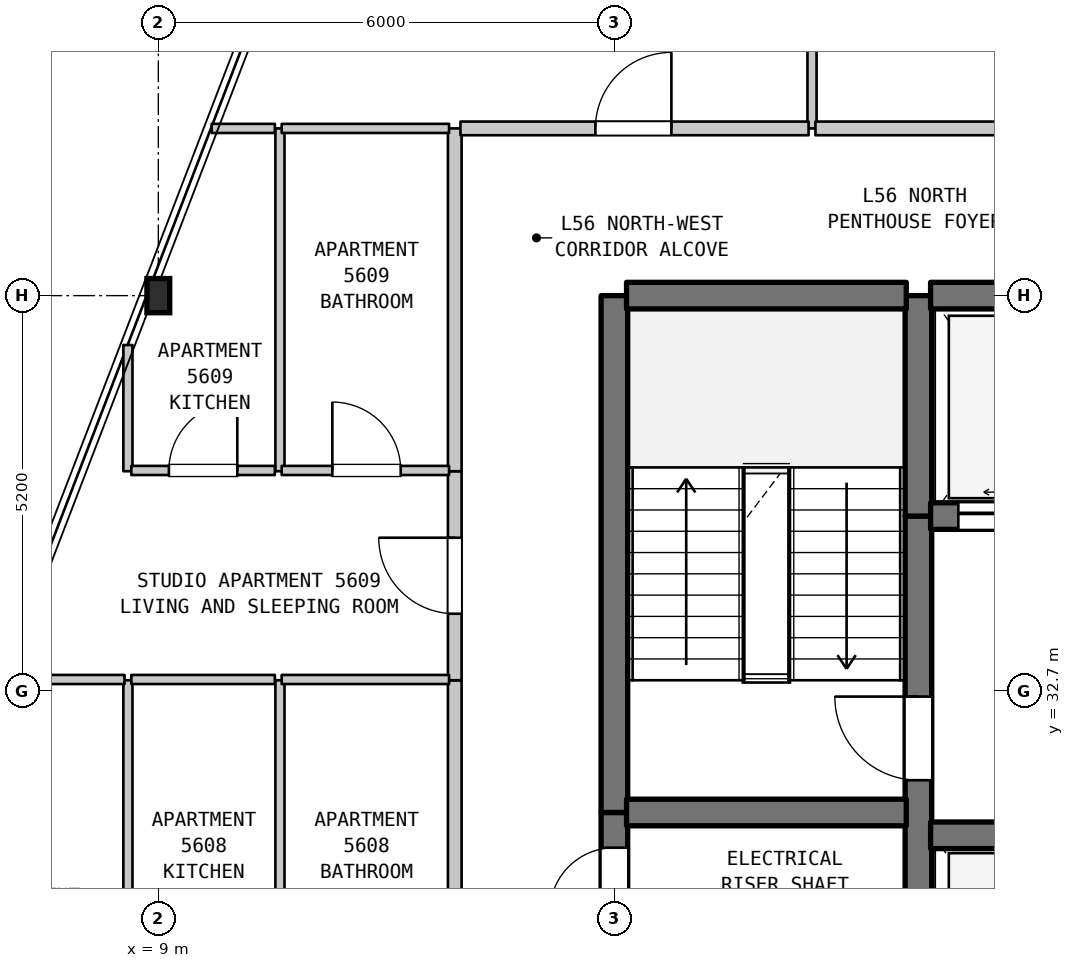
"""IFC4 building model, lengths in metres.
Left out: names, types, materials, properties, quantities, classifications, styles, units other than length and angle.
Written with IfcOpenShell. Run it as: python <this file> out.ifc"""

import sys

from ifc_helpers import new_model, si_unit, direction, frame, frame_2d, origin, origin_2d, place, context, subcontext, project, spatial, rectangle, i_section, extrude, element, fill, save


model = new_model("IFC4")
c1 = context("Model", 3, precision=1e-05, world=origin(), true_north=direction((0.0, 1.0)))
c2 = subcontext(c1, "Body", "Model", "MODEL_VIEW")
j1 = project(units=[si_unit("LENGTHUNIT", "METRE"), si_unit("PLANEANGLEUNIT", "RADIAN")], contexts=[c1])
p1 = place(None, origin())
s1 = spatial("IfcSite", under=j1, at=p1, CompositionType="ELEMENT")
p2 = place(p1, origin())
s2 = spatial("IfcBuilding", under=s1, at=p2, CompositionType="ELEMENT")
p3 = place(p2, frame((0.0, 0.0, 226.5)))
s3 = spatial("IfcBuildingStorey", under=s2, at=p3, CompositionType="ELEMENT", Elevation=226.5)
p4 = place(p3, frame((9.0, 37.9, 0.0), z_axis=(0.0, 0.0, 1.0), x_axis=(1.0, 0.0, 0.0)))
e1 = element("IfcColumn", 1, at=p4, inside=s3, PredefinedType="COLUMN", context=c2, shape_type="SweptSolid", body=[
    extrude(i_section(OverallWidth=0.3, OverallDepth=0.45, WebThickness=0.014, FlangeThickness=0.026, FilletRadius=0.027, at=origin_2d()), origin(), (0.0, 0.0, 1.0), 3.7),
])
p5 = place(p3, frame((8.6, 27.87, 0.0), z_axis=(0.0, 0.0, 1.0), x_axis=(0.0, 1.0, 0.0)))
e2 = element("IfcWall", 2, at=p5, inside=s3, PredefinedType="PARTITIONING", context=c2, shape_type="SweptSolid", body=[
    extrude(rectangle(XDim=4.97, YDim=0.12, at=frame_2d((2.485, 0.0))), origin(), (0.0, 0.0, 1.0), 3.39),
])
p6 = place(p3, frame((8.6, 35.59, 0.0), z_axis=(0.0, 0.0, 1.0), x_axis=(0.0, 1.0, 0.0)))
e3 = element("IfcWall", 3, at=p6, inside=s3, PredefinedType="PARTITIONING", context=c2, shape_type="SweptSolid", body=[
    extrude(rectangle(XDim=1.66, YDim=0.12, at=frame_2d((0.83, 0.0))), origin(), (0.0, 0.0, 1.0), 3.39),
])
p7 = place(p3, frame((10.6, 27.87, 0.0), z_axis=(0.0, 0.0, 1.0), x_axis=(0.0, 1.0, 0.0)))
e4 = element("IfcWall", 4, at=p7, inside=s3, PredefinedType="PARTITIONING", context=c2, shape_type="SweptSolid", body=[
    extrude(rectangle(XDim=4.97, YDim=0.12, at=frame_2d((2.485, 0.0))), origin(), (0.0, 0.0, 1.0), 3.39),
])
p8 = place(p3, frame((10.6, 35.59, 0.0), z_axis=(0.0, 0.0, 1.0), x_axis=(0.0, 1.0, 0.0)))
e5 = element("IfcWall", 5, at=p8, inside=s3, PredefinedType="PARTITIONING", context=c2, shape_type="SweptSolid", body=[
    extrude(rectangle(XDim=4.51, YDim=0.12, at=frame_2d((2.255, 0.0))), origin(), (0.0, 0.0, 1.0), 3.39),
])
p9 = place(p3, frame((12.9, 27.87, 0.0), z_axis=(0.0, 0.0, 1.0), x_axis=(0.0, 1.0, 0.0)))
e6 = element("IfcWall", 6, at=p9, inside=s3, PredefinedType="STANDARD", context=c2, shape_type="SweptSolid", body=[
    extrude(rectangle(XDim=4.97, YDim=0.18, at=frame_2d((2.485, 0.0))), origin(), (0.0, 0.0, 1.0), 3.39),
])
p10 = place(p3, frame((12.9, 32.84, 0.0), z_axis=(0.0, 0.0, 1.0), x_axis=(0.0, 1.0, 0.0)))
e7 = element("IfcWall", 7, at=p10, inside=s3, PredefinedType="STANDARD", context=c2, shape_type="SweptSolid", body=[
    extrude(rectangle(XDim=2.75, YDim=0.18, at=frame_2d((1.375, 0.0))), origin(), (0.0, 0.0, 1.0), 3.39),
])
p11 = place(p10, frame((0.875, 0.0, 0.0)))
e8 = element("IfcOpeningElement", 8, at=p11, cuts=e7, PredefinedType="OPENING", context=c2, shape_type="SweptSolid", body=[
    extrude(rectangle(XDim=1.0, YDim=2.15, at=frame_2d((0.5, 1.075))), frame((0.0, 0.1, 0.0), z_axis=(0.0, -1.0, 0.0), x_axis=(1.0, 0.0, 0.0)), (0.0, 0.0, 1.0), 0.2),
])
p12 = place(p3, frame((12.9, 35.59, 0.0), z_axis=(0.0, 0.0, 1.0), x_axis=(0.0, 1.0, 0.0)))
e9 = element("IfcWall", 9, at=p12, inside=s3, PredefinedType="STANDARD", context=c2, shape_type="SweptSolid", body=[
    extrude(rectangle(XDim=4.51, YDim=0.18, at=frame_2d((2.255, 0.0))), origin(), (0.0, 0.0, 1.0), 3.39),
])
p13 = place(p3, frame((15.0, 29.5, 0.0), z_axis=(0.0, 0.0, 1.0), x_axis=(0.0, 1.0, 0.0)))
e10 = element("IfcWall", 10, at=p13, inside=s3, PredefinedType="SHEAR", context=c2, shape_type="SweptSolid", body=[
    extrude(rectangle(XDim=1.6, YDim=0.35, at=frame_2d((0.8, 0.0))), origin(), (0.0, 0.0, 1.0), 3.39),
])
p14 = place(p13, frame((0.287, 0.0, 0.0)))
e11 = element("IfcOpeningElement", 11, at=p14, cuts=e10, PredefinedType="OPENING", context=c2, shape_type="SweptSolid", body=[
    extrude(rectangle(XDim=0.85, YDim=2.1, at=frame_2d((0.425, 1.05))), frame((0.0, 0.185, 0.0), z_axis=(0.0, -1.0, 0.0), x_axis=(1.0, 0.0, 0.0)), (0.0, 0.0, 1.0), 0.37),
])
p15 = place(p3, frame((15.0, 31.1, 0.0), z_axis=(0.0, 0.0, 1.0), x_axis=(0.0, 1.0, 0.0)))
e12 = element("IfcWall", 12, at=p15, inside=s3, PredefinedType="SHEAR", context=c2, shape_type="SweptSolid", body=[
    extrude(rectangle(XDim=6.8, YDim=0.35, at=frame_2d((3.4, 0.0))), origin(), (0.0, 0.0, 1.0), 3.39),
])
p16 = place(p3, frame((17.6, 40.1, 0.0), z_axis=(0.0, 0.0, 1.0), x_axis=(0.0, 1.0, 0.0)))
e13 = element("IfcWall", 13, at=p16, inside=s3, PredefinedType="PARTITIONING", context=c2, shape_type="SweptSolid", body=[
    extrude(rectangle(XDim=3.2, YDim=0.12, at=frame_2d((1.6, 0.0))), origin(), (0.0, 0.0, 1.0), 3.39),
])
p17 = place(p3, frame((19.0, 29.5, 0.0), z_axis=(0.0, 0.0, 1.0), x_axis=(0.0, 1.0, 0.0)))
e14 = element("IfcWall", 14, at=p17, inside=s3, PredefinedType="SHEAR", context=c2, shape_type="SweptSolid", body=[
    extrude(rectangle(XDim=5.5, YDim=0.35, at=frame_2d((2.75, 0.0))), origin(), (0.0, 0.0, 1.0), 3.39),
])
p18 = place(p17, frame((2.025, 0.0, 0.0)))
e15 = element("IfcOpeningElement", 15, at=p18, cuts=e14, PredefinedType="OPENING", context=c2, shape_type="SweptSolid", body=[
    extrude(rectangle(XDim=1.1, YDim=2.15, at=frame_2d((0.55, 1.075))), frame((0.0, 0.185, 0.0), z_axis=(0.0, -1.0, 0.0), x_axis=(1.0, 0.0, 0.0)), (0.0, 0.0, 1.0), 0.37),
])
p19 = place(p3, frame((19.0, 35.0, 0.0), z_axis=(0.0, 0.0, 1.0), x_axis=(0.0, 1.0, 0.0)))
e16 = element("IfcWall", 16, at=p19, inside=s3, PredefinedType="SHEAR", context=c2, shape_type="SweptSolid", body=[
    extrude(rectangle(XDim=2.9, YDim=0.35, at=frame_2d((1.45, 0.0))), origin(), (0.0, 0.0, 1.0), 3.39),
])
p20 = place(p3, frame((19.16, 30.8, 0.0), z_axis=(0.0, 0.0, 1.0), x_axis=(1.0, 0.0, 0.0)))
e17 = element("IfcWall", 17, at=p20, inside=s3, PredefinedType="SHEAR", context=c2, shape_type="SweptSolid", body=[
    extrude(rectangle(XDim=4.48, YDim=0.35, at=frame_2d((2.24, 0.0))), origin(), (0.0, 0.0, 1.0), 3.39),
])
p21 = place(p3, frame((15.16, 31.1, 0.0), z_axis=(0.0, 0.0, 1.0), x_axis=(1.0, 0.0, 0.0)))
e18 = element("IfcWall", 18, at=p21, inside=s3, PredefinedType="SHEAR", context=c2, shape_type="SweptSolid", body=[
    extrude(rectangle(XDim=3.68, YDim=0.35, at=frame_2d((1.84, 0.0))), origin(), (0.0, 0.0, 1.0), 3.39),
])
p22 = place(p3, frame((6.914, 32.85, 0.0), z_axis=(0.0, 0.0, 1.0), x_axis=(1.0, 0.0, 0.0)))
e19 = element("IfcWall", 19, at=p22, inside=s3, PredefinedType="PARTITIONING", context=c2, shape_type="SweptSolid", body=[
    extrude(rectangle(XDim=1.641, YDim=0.12, at=frame_2d((0.82, 0.0))), origin(), (0.0, 0.0, 1.0), 3.39),
])
p23 = place(p3, frame((8.645, 32.85, 0.0), z_axis=(0.0, 0.0, 1.0), x_axis=(1.0, 0.0, 0.0)))
e20 = element("IfcWall", 20, at=p23, inside=s3, PredefinedType="PARTITIONING", context=c2, shape_type="SweptSolid", body=[
    extrude(rectangle(XDim=1.888, YDim=0.12, at=frame_2d((0.944, 0.0))), origin(), (0.0, 0.0, 1.0), 3.39),
])
p24 = place(p3, frame((10.623, 32.85, 0.0), z_axis=(0.0, 0.0, 1.0), x_axis=(1.0, 0.0, 0.0)))
e21 = element("IfcWall", 21, at=p24, inside=s3, PredefinedType="PARTITIONING", context=c2, shape_type="SweptSolid", body=[
    extrude(rectangle(XDim=2.202, YDim=0.12, at=frame_2d((1.101, 0.0))), origin(), (0.0, 0.0, 1.0), 3.39),
])
p25 = place(p3, frame((19.16, 35.0, 0.0), z_axis=(0.0, 0.0, 1.0), x_axis=(1.0, 0.0, 0.0)))
e22 = element("IfcWall", 22, at=p25, inside=s3, PredefinedType="SHEAR", context=c2, shape_type="SweptSolid", body=[
    extrude(rectangle(XDim=4.48, YDim=0.35, at=frame_2d((2.24, 0.0))), origin(), (0.0, 0.0, 1.0), 3.39),
])
p26 = place(p25, frame((0.365, 0.0, 0.0)))
e23 = element("IfcOpeningElement", 23, at=p26, cuts=e22, PredefinedType="OPENING", context=c2, shape_type="SweptSolid", body=[
    extrude(rectangle(XDim=1.35, YDim=2.2, at=frame_2d((0.675, 1.1))), frame((0.0, 0.185, 0.0), z_axis=(0.0, -1.0, 0.0), x_axis=(1.0, 0.0, 0.0)), (0.0, 0.0, 1.0), 0.37),
])
p27 = place(p25, frame((2.765, 0.0, 0.0)))
e24 = element("IfcOpeningElement", 24, at=p27, cuts=e22, PredefinedType="OPENING", context=c2, shape_type="SweptSolid", body=[
    extrude(rectangle(XDim=1.35, YDim=2.2, at=frame_2d((0.675, 1.1))), frame((0.0, 0.185, 0.0), z_axis=(0.0, -1.0, 0.0), x_axis=(1.0, 0.0, 0.0)), (0.0, 0.0, 1.0), 0.37),
])
p28 = place(p3, frame((8.645, 35.6, 0.0), z_axis=(0.0, 0.0, 1.0), x_axis=(1.0, 0.0, 0.0)))
e25 = element("IfcWall", 25, at=p28, inside=s3, PredefinedType="PARTITIONING", context=c2, shape_type="SweptSolid", body=[
    extrude(rectangle(XDim=1.888, YDim=0.12, at=frame_2d((0.944, 0.0))), origin(), (0.0, 0.0, 1.0), 3.39),
])
p29 = place(p28, frame((0.494, 0.0, 0.0)))
e26 = element("IfcOpeningElement", 26, at=p29, cuts=e25, PredefinedType="OPENING", context=c2, shape_type="SweptSolid", body=[
    extrude(rectangle(XDim=0.9, YDim=2.15, at=frame_2d((0.45, 1.075))), frame((0.0, 0.07, 0.0), z_axis=(0.0, -1.0, 0.0), x_axis=(1.0, 0.0, 0.0)), (0.0, 0.0, 1.0), 0.14),
])
p30 = place(p3, frame((10.623, 35.6, 0.0), z_axis=(0.0, 0.0, 1.0), x_axis=(1.0, 0.0, 0.0)))
e27 = element("IfcWall", 27, at=p30, inside=s3, PredefinedType="PARTITIONING", context=c2, shape_type="SweptSolid", body=[
    extrude(rectangle(XDim=2.202, YDim=0.12, at=frame_2d((1.101, 0.0))), origin(), (0.0, 0.0, 1.0), 3.39),
])
p31 = place(p30, frame((0.666, 0.0, 0.0)))
e28 = element("IfcOpeningElement", 28, at=p31, cuts=e27, PredefinedType="OPENING", context=c2, shape_type="SweptSolid", body=[
    extrude(rectangle(XDim=0.9, YDim=2.1, at=frame_2d((0.45, 1.05))), frame((0.0, 0.07, 0.0), z_axis=(0.0, -1.0, 0.0), x_axis=(1.0, 0.0, 0.0)), (0.0, 0.0, 1.0), 0.14),
])
p32 = place(p3, frame((15.16, 37.9, 0.0), z_axis=(0.0, 0.0, 1.0), x_axis=(1.0, 0.0, 0.0)))
e29 = element("IfcWall", 29, at=p32, inside=s3, PredefinedType="SHEAR", context=c2, shape_type="SweptSolid", body=[
    extrude(rectangle(XDim=3.68, YDim=0.35, at=frame_2d((1.84, 0.0))), origin(), (0.0, 0.0, 1.0), 3.39),
])
p33 = place(p3, frame((19.16, 37.9, 0.0), z_axis=(0.0, 0.0, 1.0), x_axis=(1.0, 0.0, 0.0)))
e30 = element("IfcWall", 30, at=p33, inside=s3, PredefinedType="SHEAR", context=c2, shape_type="SweptSolid", body=[
    extrude(rectangle(XDim=4.48, YDim=0.35, at=frame_2d((2.24, 0.0))), origin(), (0.0, 0.0, 1.0), 3.39),
])
p34 = place(p3, frame((9.702, 40.1, 0.0), z_axis=(0.0, 0.0, 1.0), x_axis=(1.0, 0.0, 0.0)))
e31 = element("IfcWall", 31, at=p34, inside=s3, PredefinedType="PARTITIONING", context=c2, shape_type="SweptSolid", body=[
    extrude(rectangle(XDim=0.831, YDim=0.12, at=frame_2d((0.416, 0.0))), origin(), (0.0, 0.0, 1.0), 3.39),
])
p35 = place(p3, frame((10.623, 40.1, 0.0), z_axis=(0.0, 0.0, 1.0), x_axis=(1.0, 0.0, 0.0)))
e32 = element("IfcWall", 32, at=p35, inside=s3, PredefinedType="PARTITIONING", context=c2, shape_type="SweptSolid", body=[
    extrude(rectangle(XDim=2.202, YDim=0.12, at=frame_2d((1.101, 0.0))), origin(), (0.0, 0.0, 1.0), 3.39),
])
p36 = place(p3, frame((12.975, 40.1, 0.0), z_axis=(0.0, 0.0, 1.0), x_axis=(1.0, 0.0, 0.0)))
e33 = element("IfcWall", 33, at=p36, inside=s3, PredefinedType="STANDARD", context=c2, shape_type="SweptSolid", body=[
    extrude(rectangle(XDim=4.58, YDim=0.18, at=frame_2d((2.29, 0.0))), origin(), (0.0, 0.0, 1.0), 3.39),
])
p37 = place(p36, frame((1.775, 0.0, 0.0)))
e34 = element("IfcOpeningElement", 34, at=p37, cuts=e33, PredefinedType="OPENING", context=c2, shape_type="SweptSolid", body=[
    extrude(rectangle(XDim=1.0, YDim=2.15, at=frame_2d((0.5, 1.075))), frame((0.0, 0.1, 0.0), z_axis=(0.0, -1.0, 0.0), x_axis=(1.0, 0.0, 0.0)), (0.0, 0.0, 1.0), 0.2),
])
p38 = place(p3, frame((17.645, 40.1, 0.0), z_axis=(0.0, 0.0, 1.0), x_axis=(1.0, 0.0, 0.0)))
e35 = element("IfcWall", 35, at=p38, inside=s3, PredefinedType="STANDARD", context=c2, shape_type="SweptSolid", body=[
    extrude(rectangle(XDim=2.61, YDim=0.18, at=frame_2d((1.305, 0.0))), origin(), (0.0, 0.0, 1.0), 3.39),
])
p39 = place(p11, origin())
e36 = element("IfcDoor", 36, at=p39, inside=s3, OperationType="SINGLE_SWING_RIGHT", PredefinedType="DOOR", context=c2, shape_type="SweptSolid", body=[
    extrude(rectangle(XDim=1.0, YDim=2.15, at=frame_2d((0.5, 1.075))), frame((0.0, 0.025, 0.0), z_axis=(0.0, -1.0, 0.0), x_axis=(1.0, 0.0, 0.0)), (0.0, 0.0, 1.0), 0.05),
])
fill(e8, e36)
p40 = place(p14, origin())
e37 = element("IfcDoor", 37, at=p40, inside=s3, OperationType="SINGLE_SWING_LEFT", PredefinedType="DOOR", context=c2, shape_type="SweptSolid", body=[
    extrude(rectangle(XDim=0.85, YDim=2.1, at=frame_2d((0.425, 1.05))), frame((0.0, 0.025, 0.0), z_axis=(0.0, -1.0, 0.0), x_axis=(1.0, 0.0, 0.0)), (0.0, 0.0, 1.0), 0.05),
])
fill(e11, e37)
p41 = place(p18, origin())
e38 = element("IfcDoor", 38, at=p41, inside=s3, OperationType="SINGLE_SWING_RIGHT", PredefinedType="DOOR", context=c2, shape_type="SweptSolid", body=[
    extrude(rectangle(XDim=1.1, YDim=2.15, at=frame_2d((0.55, 1.075))), frame((0.0, 0.025, 0.0), z_axis=(0.0, -1.0, 0.0), x_axis=(1.0, 0.0, 0.0)), (0.0, 0.0, 1.0), 0.05),
])
fill(e15, e38)
p42 = place(p26, origin())
e39 = element("IfcDoor", 39, at=p42, inside=s3, OperationType="DOUBLE_DOOR_SLIDING", PredefinedType="DOOR", context=c2, shape_type="SweptSolid", body=[
    extrude(rectangle(XDim=1.35, YDim=2.2, at=frame_2d((0.675, 1.1))), frame((0.0, 0.025, 0.0), z_axis=(0.0, -1.0, 0.0), x_axis=(1.0, 0.0, 0.0)), (0.0, 0.0, 1.0), 0.05),
])
fill(e23, e39)
p43 = place(p29, origin())
e40 = element("IfcDoor", 40, at=p43, inside=s3, OperationType="SINGLE_SWING_RIGHT", PredefinedType="DOOR", context=c2, shape_type="SweptSolid", body=[
    extrude(rectangle(XDim=0.9, YDim=2.15, at=frame_2d((0.45, 1.075))), frame((0.0, 0.025, 0.0), z_axis=(0.0, -1.0, 0.0), x_axis=(1.0, 0.0, 0.0)), (0.0, 0.0, 1.0), 0.05),
])
fill(e26, e40)
p44 = place(p31, origin())
e41 = element("IfcDoor", 41, at=p44, inside=s3, OperationType="SINGLE_SWING_LEFT", PredefinedType="DOOR", context=c2, shape_type="SweptSolid", body=[
    extrude(rectangle(XDim=0.9, YDim=2.1, at=frame_2d((0.45, 1.05))), frame((0.0, 0.025, 0.0), z_axis=(0.0, -1.0, 0.0), x_axis=(1.0, 0.0, 0.0)), (0.0, 0.0, 1.0), 0.05),
])
fill(e28, e41)
p45 = place(p37, origin())
e42 = element("IfcDoor", 42, at=p45, inside=s3, OperationType="SINGLE_SWING_RIGHT", PredefinedType="DOOR", context=c2, shape_type="SweptSolid", body=[
    extrude(rectangle(XDim=1.0, YDim=2.15, at=frame_2d((0.5, 1.075))), frame((0.0, 0.025, 0.0), z_axis=(0.0, -1.0, 0.0), x_axis=(1.0, 0.0, 0.0)), (0.0, 0.0, 1.0), 0.05),
])
fill(e34, e42)
save(model, sys.argv[1])
